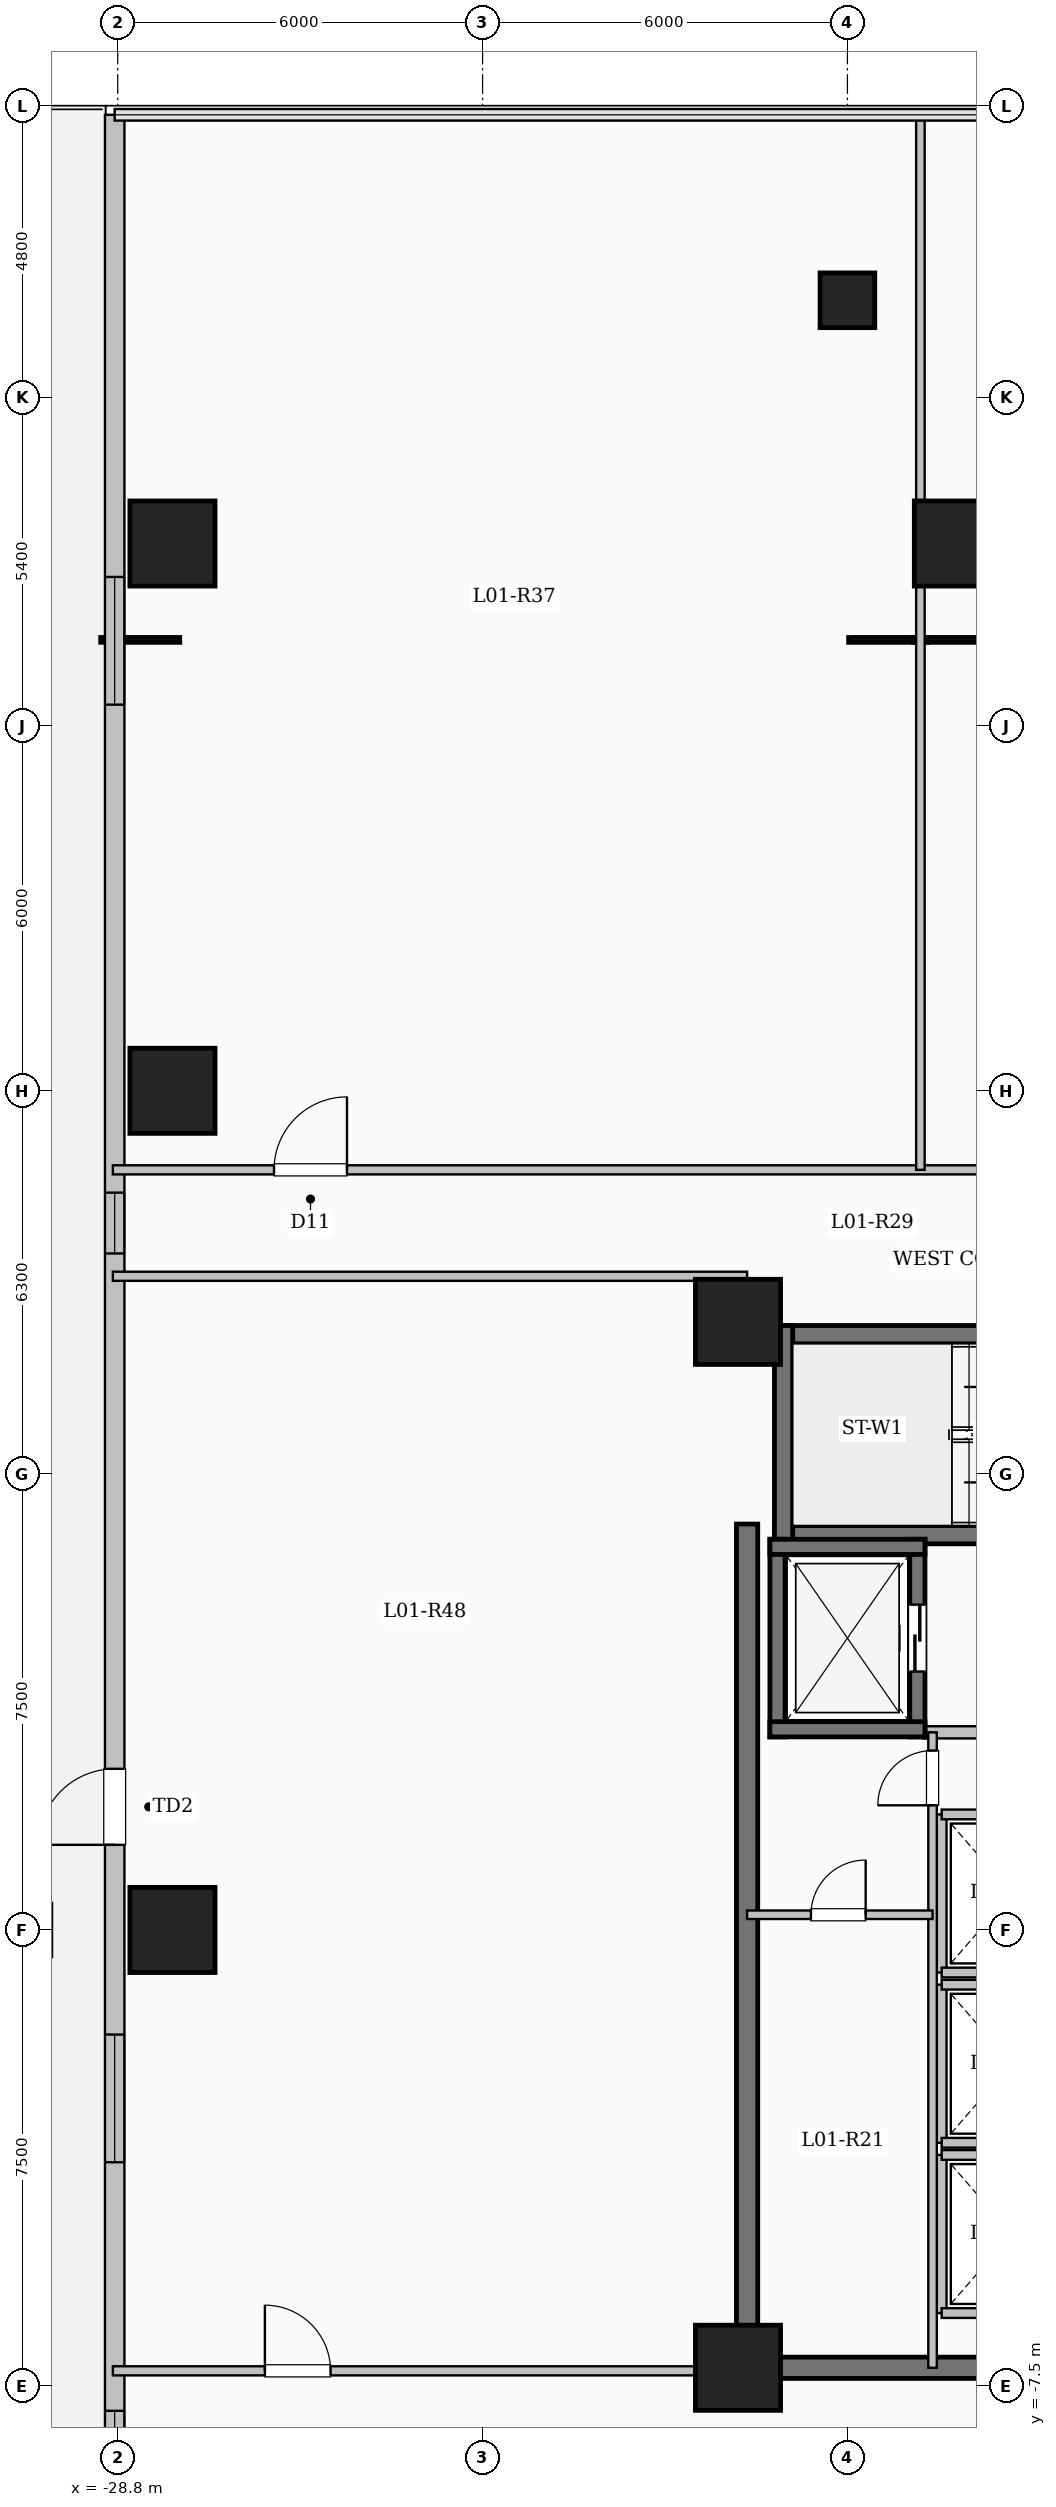
"""IFC4 building model, lengths in metres.
Left out: names, types, materials, properties, quantities, classifications, styles, units other than length and angle.
Written with IfcOpenShell. Run it as: python <this file> out.ifc"""

import sys

from ifc_helpers import new_model, si_unit, direction, frame, frame_2d, origin, origin_2d, place, context, subcontext, project, spatial, rectangle, extrude, element, fill, save


model = new_model("IFC4")
c1 = context("Model", 3, precision=1e-05, world=origin(), true_north=direction((0.0, 1.0)))
c2 = subcontext(c1, "Body", "Model", "MODEL_VIEW")
j1 = project(units=[si_unit("LENGTHUNIT", "METRE"), si_unit("PLANEANGLEUNIT", "RADIAN")], contexts=[c1])
p1 = place(None, origin())
s1 = spatial("IfcSite", under=j1, at=p1, CompositionType="ELEMENT")
p2 = place(p1, origin())
s2 = spatial("IfcBuilding", under=s1, at=p2, CompositionType="ELEMENT")
p3 = place(p2, frame((0.0, 0.0, 5.4)))
s3 = spatial("IfcBuildingStorey", under=s2, at=p3, CompositionType="ELEMENT", Elevation=5.4)
for number, where, z_axis, x_axis in (
    (1, (-18.6, -7.2, 0.0), (0.0, 0.0, 1.0), (1.0, 0.0, 0.0)),
    (2, (-18.6, 10.0, 0.0), (0.0, 0.0, 1.0), (1.0, 0.0, 0.0)),
):
    element("IfcColumn", number, at=place(p3, frame(where, z_axis=z_axis, x_axis=x_axis)), inside=s3, PredefinedType="COLUMN", context=c2, shape_type="SweptSolid", body=[
        extrude(rectangle(XDim=1.4, YDim=1.4, at=origin_2d()), origin(), (0.0, 0.0, 1.0), 4.5),
    ])
p4 = place(p3, frame((-16.8, 26.8, 0.0), z_axis=(0.0, 0.0, 1.0), x_axis=(1.0, 0.0, 0.0)))
e3 = element("IfcColumn", 3, at=p4, inside=s3, PredefinedType="COLUMN", context=c2, shape_type="SweptSolid", body=[
    extrude(rectangle(XDim=0.9, YDim=0.9, at=origin_2d()), origin(), (0.0, 0.0, 1.0), 4.5),
])
for number, where, z_axis, x_axis in (
    (4, (-27.9, 22.8, 0.0), (0.0, 0.0, 1.0), (1.0, 0.0, 0.0)),
    (5, (-15.0, 22.8, 0.0), (0.0, 0.0, 1.0), (1.0, 0.0, 0.0)),
    (6, (-27.9, 0.0, 0.0), (0.0, 0.0, 1.0), (1.0, 0.0, 0.0)),
    (7, (-27.9, 13.8, 0.0), (0.0, 0.0, 1.0), (1.0, 0.0, 0.0)),
):
    element("IfcColumn", number, at=place(p3, frame(where, z_axis=z_axis, x_axis=x_axis)), inside=s3, PredefinedType="COLUMN", context=c2, shape_type="SweptSolid", body=[
        extrude(rectangle(XDim=1.4, YDim=1.4, at=origin_2d()), origin(), (0.0, 0.0, 1.0), 4.5),
    ])
p5 = place(p3, frame((-28.85, -29.85, 0.0), z_axis=(0.0, 0.0, 1.0), x_axis=(0.0, 1.0, 0.0)))
e8 = element("IfcWall", 8, at=p5, inside=s3, PredefinedType="SOLIDWALL", context=c2, shape_type="SweptSolid", body=[
    extrude(rectangle(XDim=59.7, YDim=0.32, at=frame_2d((29.85, 0.0))), origin(), (0.0, 0.0, 1.0), 4.2),
])
p6 = place(p5, frame((31.25, 0.0, 0.0)))
e9 = element("IfcOpeningElement", 9, at=p6, cuts=e8, PredefinedType="OPENING", context=c2, shape_type="SweptSolid", body=[
    extrude(rectangle(XDim=1.25, YDim=2.25, at=frame_2d((0.625, 1.125))), frame((0.0, 0.17, 0.0), z_axis=(0.0, -1.0, 0.0), x_axis=(1.0, 0.0, 0.0)), (0.0, 0.0, 1.0), 0.34),
])
p7 = place(p5, frame((8.65, 0.0, 0.9)))
e10 = element("IfcOpeningElement", 10, at=p7, cuts=e8, PredefinedType="OPENING", context=c2, shape_type="SweptSolid", body=[
    extrude(rectangle(XDim=2.1, YDim=2.0, at=frame_2d((1.05, 1.0))), frame((0.0, 0.17, 0.0), z_axis=(0.0, -1.0, 0.0), x_axis=(1.0, 0.0, 0.0)), (0.0, 0.0, 1.0), 0.34),
])
p8 = place(p5, frame((20.242, 0.0, 0.9)))
e11 = element("IfcOpeningElement", 11, at=p8, cuts=e8, PredefinedType="OPENING", context=c2, shape_type="SweptSolid", body=[
    extrude(rectangle(XDim=1.7, YDim=1.9, at=frame_2d((0.85, 0.95))), frame((0.0, 0.17, 0.0), z_axis=(0.0, -1.0, 0.0), x_axis=(1.0, 0.0, 0.0)), (0.0, 0.0, 1.0), 0.34),
])
p9 = place(p5, frame((26.03, 0.0, 0.9)))
e12 = element("IfcOpeningElement", 12, at=p9, cuts=e8, PredefinedType="OPENING", context=c2, shape_type="SweptSolid", body=[
    extrude(rectangle(XDim=2.1, YDim=2.0, at=frame_2d((1.05, 1.0))), frame((0.0, 0.17, 0.0), z_axis=(0.0, -1.0, 0.0), x_axis=(1.0, 0.0, 0.0)), (0.0, 0.0, 1.0), 0.34),
])
p10 = place(p5, frame((40.975, 0.0, 0.95)))
e13 = element("IfcOpeningElement", 13, at=p10, cuts=e8, PredefinedType="OPENING", context=c2, shape_type="SweptSolid", body=[
    extrude(rectangle(XDim=1.0, YDim=1.5, at=frame_2d((0.5, 0.75))), frame((0.0, 0.17, 0.0), z_axis=(0.0, -1.0, 0.0), x_axis=(1.0, 0.0, 0.0)), (0.0, 0.0, 1.0), 0.34),
])
p11 = place(p5, frame((50.0, 0.0, 0.9)))
e14 = element("IfcOpeningElement", 14, at=p11, cuts=e8, PredefinedType="OPENING", context=c2, shape_type="SweptSolid", body=[
    extrude(rectangle(XDim=2.1, YDim=2.0, at=frame_2d((1.05, 1.0))), frame((0.0, 0.17, 0.0), z_axis=(0.0, -1.0, 0.0), x_axis=(1.0, 0.0, 0.0)), (0.0, 0.0, 1.0), 0.34),
])
p12 = place(p3, frame((-18.0, 9.79, 0.0), z_axis=(0.0, 0.0, 1.0), x_axis=(1.0, 0.0, 0.0)))
e15 = element("IfcWall", 15, at=p12, inside=s3, PredefinedType="SHEAR", context=c2, shape_type="SweptSolid", body=[
    extrude(rectangle(XDim=8.0, YDim=0.3, at=frame_2d((4.0, 0.0))), origin(), (0.0, 0.0, 1.0), 4.5),
])
p13 = place(p3, frame((-18.0, 6.5, 0.0), z_axis=(0.0, 0.0, 1.0), x_axis=(1.0, 0.0, 0.0)))
e16 = element("IfcWall", 16, at=p13, inside=s3, PredefinedType="SHEAR", context=c2, shape_type="SweptSolid", body=[
    extrude(rectangle(XDim=8.0, YDim=0.3, at=frame_2d((4.0, 0.0))), origin(), (0.0, 0.0, 1.0), 4.5),
])
p14 = place(p13, frame((6.45, 0.0, 0.0)))
e17 = element("IfcOpeningElement", 17, at=p14, cuts=e16, PredefinedType="OPENING", context=c2, shape_type="SweptSolid", body=[
    extrude(rectangle(XDim=1.0, YDim=2.15, at=frame_2d((0.5, 1.075))), frame((0.0, 0.16, 0.0), z_axis=(0.0, -1.0, 0.0), x_axis=(1.0, 0.0, 0.0)), (0.0, 0.0, 1.0), 0.32),
])
p15 = place(p3, frame((-17.85, 6.35, 0.0), z_axis=(0.0, 0.0, 1.0), x_axis=(0.0, 1.0, 0.0)))
e18 = element("IfcWall", 18, at=p15, inside=s3, PredefinedType="SHEAR", context=c2, shape_type="SweptSolid", body=[
    extrude(rectangle(XDim=3.59, YDim=0.3, at=frame_2d((1.795, 0.0))), origin(), (0.0, 0.0, 1.0), 4.5),
])
p16 = place(p3, frame((-15.55, 3.25, 0.0), z_axis=(0.0, 0.0, 1.0), x_axis=(1.0, 0.0, 0.0)))
e19 = element("IfcWall", 19, at=p16, inside=s3, PredefinedType="SOLIDWALL", context=c2, shape_type="SweptSolid", body=[
    extrude(rectangle(XDim=5.4, YDim=0.2, at=frame_2d((2.7, 0.0))), origin(), (0.0, 0.0, 1.0), 4.2),
])
p17 = place(p3, frame((-17.95, 3.175, 0.0), z_axis=(0.0, 0.0, 1.0), x_axis=(0.0, 1.0, 0.0)))
e20 = element("IfcWall", 20, at=p17, inside=s3, PredefinedType="SHEAR", context=c2, shape_type="SweptSolid", body=[
    extrude(rectangle(XDim=3.25, YDim=0.25, at=frame_2d((1.625, 0.0))), origin(), (0.0, 0.0, 1.0), 4.5),
])
p18 = place(p3, frame((-15.65, 3.175, 0.0), z_axis=(0.0, 0.0, 1.0), x_axis=(0.0, 1.0, 0.0)))
e21 = element("IfcWall", 21, at=p18, inside=s3, PredefinedType="SHEAR", context=c2, shape_type="SweptSolid", body=[
    extrude(rectangle(XDim=3.25, YDim=0.25, at=frame_2d((1.625, 0.0))), origin(), (0.0, 0.0, 1.0), 4.5),
])
p19 = place(p18, frame((1.075, 0.0, 0.0)))
e22 = element("IfcOpeningElement", 22, at=p19, cuts=e21, PredefinedType="OPENING", context=c2, shape_type="SweptSolid", body=[
    extrude(rectangle(XDim=1.1, YDim=2.15, at=frame_2d((0.55, 1.075))), frame((0.0, 0.135, 0.0), z_axis=(0.0, -1.0, 0.0), x_axis=(1.0, 0.0, 0.0)), (0.0, 0.0, 1.0), 0.27),
])
for number, where, z_axis, x_axis in (
    (23, (-18.075, 3.3, 0.0), (0.0, 0.0, 1.0), (1.0, 0.0, 0.0)),
    (24, (-18.075, 6.3, 0.0), (0.0, 0.0, 1.0), (1.0, 0.0, 0.0)),
):
    element("IfcWall", number, at=place(p3, frame(where, z_axis=z_axis, x_axis=x_axis)), inside=s3, PredefinedType="SHEAR", context=c2, shape_type="SweptSolid", body=[
        extrude(rectangle(XDim=2.55, YDim=0.25, at=frame_2d((1.275, 0.0))), origin(), (0.0, 0.0, 1.0), 4.5),
    ])
p20 = place(p3, frame((-15.25, -6.3, 0.0), z_axis=(0.0, 0.0, 1.0), x_axis=(0.0, 1.0, 0.0)))
e25 = element("IfcWall", 25, at=p20, inside=s3, PredefinedType="SOLIDWALL", context=c2, shape_type="SweptSolid", body=[
    extrude(rectangle(XDim=2.6, YDim=0.16, at=frame_2d((1.3, 0.0))), origin(), (0.0, 0.0, 1.0), 4.2),
])
for number, where, z_axis, x_axis in (
    (26, (-15.25, -6.3, 0.0), (0.0, 0.0, 1.0), (1.0, 0.0, 0.0)),
    (27, (-15.25, -3.7, 0.0), (0.0, 0.0, 1.0), (1.0, 0.0, 0.0)),
):
    element("IfcWall", number, at=place(p3, frame(where, z_axis=z_axis, x_axis=x_axis)), inside=s3, PredefinedType="SOLIDWALL", context=c2, shape_type="SweptSolid", body=[
        extrude(rectangle(XDim=2.3, YDim=0.16, at=frame_2d((1.15, 0.0))), origin(), (0.0, 0.0, 1.0), 4.2),
    ])
p21 = place(p3, frame((-15.25, -3.5, 0.0), z_axis=(0.0, 0.0, 1.0), x_axis=(0.0, 1.0, 0.0)))
e28 = element("IfcWall", 28, at=p21, inside=s3, PredefinedType="SOLIDWALL", context=c2, shape_type="SweptSolid", body=[
    extrude(rectangle(XDim=2.6, YDim=0.16, at=frame_2d((1.3, 0.0))), origin(), (0.0, 0.0, 1.0), 4.2),
])
for number, where, z_axis, x_axis in (
    (29, (-15.25, -3.5, 0.0), (0.0, 0.0, 1.0), (1.0, 0.0, 0.0)),
    (30, (-15.25, -0.9, 0.0), (0.0, 0.0, 1.0), (1.0, 0.0, 0.0)),
):
    element("IfcWall", number, at=place(p3, frame(where, z_axis=z_axis, x_axis=x_axis)), inside=s3, PredefinedType="SOLIDWALL", context=c2, shape_type="SweptSolid", body=[
        extrude(rectangle(XDim=2.3, YDim=0.16, at=frame_2d((1.15, 0.0))), origin(), (0.0, 0.0, 1.0), 4.2),
    ])
p22 = place(p3, frame((-15.25, -0.7, 0.0), z_axis=(0.0, 0.0, 1.0), x_axis=(0.0, 1.0, 0.0)))
e31 = element("IfcWall", 31, at=p22, inside=s3, PredefinedType="SOLIDWALL", context=c2, shape_type="SweptSolid", body=[
    extrude(rectangle(XDim=2.6, YDim=0.16, at=frame_2d((1.3, 0.0))), origin(), (0.0, 0.0, 1.0), 4.2),
])
for number, where, z_axis, x_axis in (
    (32, (-15.25, -0.7, 0.0), (0.0, 0.0, 1.0), (1.0, 0.0, 0.0)),
    (33, (-15.25, 1.9, 0.0), (0.0, 0.0, 1.0), (1.0, 0.0, 0.0)),
):
    element("IfcWall", number, at=place(p3, frame(where, z_axis=z_axis, x_axis=x_axis)), inside=s3, PredefinedType="SOLIDWALL", context=c2, shape_type="SweptSolid", body=[
        extrude(rectangle(XDim=2.3, YDim=0.16, at=frame_2d((1.15, 0.0))), origin(), (0.0, 0.0, 1.0), 4.2),
    ])
p23 = place(p3, frame((-18.45, -7.375, 0.0), z_axis=(0.0, 0.0, 1.0), x_axis=(0.0, 1.0, 0.0)))
e34 = element("IfcWall", 34, at=p23, inside=s3, PredefinedType="SHEAR", context=c2, shape_type="SweptSolid", body=[
    extrude(rectangle(XDim=14.05, YDim=0.35, at=frame_2d((7.025, 0.0))), origin(), (0.0, 0.0, 1.0), 4.5),
])
p24 = place(p3, frame((-18.625, -7.2, 0.0), z_axis=(0.0, 0.0, 1.0), x_axis=(1.0, 0.0, 0.0)))
e35 = element("IfcWall", 35, at=p24, inside=s3, PredefinedType="SHEAR", context=c2, shape_type="SweptSolid", body=[
    extrude(rectangle(XDim=8.55, YDim=0.35, at=frame_2d((4.275, 0.0))), origin(), (0.0, 0.0, 1.0), 4.5),
])
p25 = place(p3, frame((-15.4, -7.2, 0.0), z_axis=(0.0, 0.0, 1.0), x_axis=(0.0, 1.0, 0.0)))
e36 = element("IfcWall", 36, at=p25, inside=s3, PredefinedType="PARTITIONING", context=c2, shape_type="SweptSolid", body=[
    extrude(rectangle(XDim=10.45, YDim=0.14, at=frame_2d((5.225, 0.0))), origin(), (0.0, 0.0, 1.0), 4.2),
])
p26 = place(p25, frame((9.25, 0.0, 0.0)))
e37 = element("IfcOpeningElement", 37, at=p26, cuts=e36, PredefinedType="OPENING", context=c2, shape_type="SweptSolid", body=[
    extrude(rectangle(XDim=0.9, YDim=2.08, at=frame_2d((0.45, 1.04))), frame((0.0, 0.08, 0.0), z_axis=(0.0, -1.0, 0.0), x_axis=(1.0, 0.0, 0.0)), (0.0, 0.0, 1.0), 0.16),
])
p27 = place(p3, frame((-18.45, 0.25, 0.0), z_axis=(0.0, 0.0, 1.0), x_axis=(1.0, 0.0, 0.0)))
e38 = element("IfcWall", 38, at=p27, inside=s3, PredefinedType="PARTITIONING", context=c2, shape_type="SweptSolid", body=[
    extrude(rectangle(XDim=3.05, YDim=0.14, at=frame_2d((1.525, 0.0))), origin(), (0.0, 0.0, 1.0), 4.2),
])
p28 = place(p27, frame((1.05, 0.0, 0.0)))
e39 = element("IfcOpeningElement", 39, at=p28, cuts=e38, PredefinedType="OPENING", context=c2, shape_type="SweptSolid", body=[
    extrude(rectangle(XDim=0.9, YDim=2.08, at=frame_2d((0.45, 1.04))), frame((0.0, 0.08, 0.0), z_axis=(0.0, -1.0, 0.0), x_axis=(1.0, 0.0, 0.0)), (0.0, 0.0, 1.0), 0.16),
])
p29 = place(p3, frame((-28.88, 12.5, 0.0), z_axis=(0.0, 0.0, 1.0), x_axis=(1.0, 0.0, 0.0)))
e40 = element("IfcWall", 40, at=p29, inside=s3, PredefinedType="PARTITIONING", context=c2, shape_type="SweptSolid", body=[
    extrude(rectangle(XDim=25.03, YDim=0.15, at=frame_2d((12.515, 0.0))), origin(), (0.0, 0.0, 1.0), 4.2),
])
p30 = place(p29, frame((2.65, 0.0, 0.0)))
e41 = element("IfcOpeningElement", 41, at=p30, cuts=e40, PredefinedType="OPENING", context=c2, shape_type="SweptSolid", body=[
    extrude(rectangle(XDim=1.2, YDim=2.15, at=frame_2d((0.6, 1.075))), frame((0.0, 0.085, 0.0), z_axis=(0.0, -1.0, 0.0), x_axis=(1.0, 0.0, 0.0)), (0.0, 0.0, 1.0), 0.17),
])
p31 = place(p29, frame((14.68, 0.0, 0.0)))
e42 = element("IfcOpeningElement", 42, at=p31, cuts=e40, PredefinedType="OPENING", context=c2, shape_type="SweptSolid", body=[
    extrude(rectangle(XDim=1.08, YDim=2.15, at=frame_2d((0.54, 1.075))), frame((0.0, 0.085, 0.0), z_axis=(0.0, -1.0, 0.0), x_axis=(1.0, 0.0, 0.0)), (0.0, 0.0, 1.0), 0.17),
])
p32 = place(p29, frame((20.52, 0.0, 0.0)))
e43 = element("IfcOpeningElement", 43, at=p32, cuts=e40, PredefinedType="OPENING", context=c2, shape_type="SweptSolid", body=[
    extrude(rectangle(XDim=1.08, YDim=2.15, at=frame_2d((0.54, 1.075))), frame((0.0, 0.085, 0.0), z_axis=(0.0, -1.0, 0.0), x_axis=(1.0, 0.0, 0.0)), (0.0, 0.0, 1.0), 0.17),
])
p33 = place(p3, frame((-15.6, 12.5, 0.0), z_axis=(0.0, 0.0, 1.0), x_axis=(0.0, 1.0, 0.0)))
e44 = element("IfcWall", 44, at=p33, inside=s3, PredefinedType="PARTITIONING", context=c2, shape_type="SweptSolid", body=[
    extrude(rectangle(XDim=17.38, YDim=0.14, at=frame_2d((8.69, 0.0))), origin(), (0.0, 0.0, 1.0), 3.385),
])
p34 = place(p3, frame((-28.88, -7.25, 0.0), z_axis=(0.0, 0.0, 1.0), x_axis=(1.0, 0.0, 0.0)))
e45 = element("IfcWall", 45, at=p34, inside=s3, PredefinedType="PARTITIONING", context=c2, shape_type="SweptSolid", body=[
    extrude(rectangle(XDim=10.43, YDim=0.15, at=frame_2d((5.215, 0.0))), origin(), (0.0, 0.0, 1.0), 4.2),
])
p35 = place(p34, frame((2.5, 0.0, 0.0)))
e46 = element("IfcOpeningElement", 46, at=p35, cuts=e45, PredefinedType="OPENING", context=c2, shape_type="SweptSolid", body=[
    extrude(rectangle(XDim=1.08, YDim=2.15, at=frame_2d((0.54, 1.075))), frame((0.0, 0.085, 0.0), z_axis=(0.0, -1.0, 0.0), x_axis=(1.0, 0.0, 0.0)), (0.0, 0.0, 1.0), 0.17),
])
p36 = place(p3, frame((-28.88, 10.75, 0.0), z_axis=(0.0, 0.0, 1.0), x_axis=(1.0, 0.0, 0.0)))
e47 = element("IfcWall", 47, at=p36, inside=s3, PredefinedType="PARTITIONING", context=c2, shape_type="SweptSolid", body=[
    extrude(rectangle(XDim=10.43, YDim=0.15, at=frame_2d((5.215, 0.0))), origin(), (0.0, 0.0, 1.0), 4.2),
])
p37 = place(p6, origin())
e48 = element("IfcDoor", 48, at=p37, inside=s3, OperationType="SINGLE_SWING_LEFT", PredefinedType="DOOR", context=c2, shape_type="SweptSolid", body=[
    extrude(rectangle(XDim=1.25, YDim=2.25, at=frame_2d((0.625, 1.125))), frame((0.0, 0.025, 0.0), z_axis=(0.0, -1.0, 0.0), x_axis=(1.0, 0.0, 0.0)), (0.0, 0.0, 1.0), 0.05),
])
fill(e9, e48)
p38 = place(p8, origin())
e49 = element("IfcWindow", 49, at=p38, inside=s3, PartitioningType="SINGLE_PANEL", PredefinedType="WINDOW", context=c2, shape_type="SweptSolid", body=[
    extrude(rectangle(XDim=1.7, YDim=1.9, at=frame_2d((0.85, 0.95))), frame((0.0, 0.03, 0.0), z_axis=(0.0, -1.0, 0.0), x_axis=(1.0, 0.0, 0.0)), (0.0, 0.0, 1.0), 0.06),
])
fill(e11, e49)
p39 = place(p9, origin())
e50 = element("IfcWindow", 50, at=p39, inside=s3, PartitioningType="SINGLE_PANEL", PredefinedType="WINDOW", context=c2, shape_type="SweptSolid", body=[
    extrude(rectangle(XDim=2.1, YDim=2.0, at=frame_2d((1.05, 1.0))), frame((0.0, 0.03, 0.0), z_axis=(0.0, -1.0, 0.0), x_axis=(1.0, 0.0, 0.0)), (0.0, 0.0, 1.0), 0.06),
])
fill(e12, e50)
p40 = place(p10, origin())
e51 = element("IfcWindow", 51, at=p40, inside=s3, PartitioningType="SINGLE_PANEL", PredefinedType="WINDOW", context=c2, shape_type="SweptSolid", body=[
    extrude(rectangle(XDim=1.0, YDim=1.5, at=frame_2d((0.5, 0.75))), frame((0.0, 0.03, 0.0), z_axis=(0.0, -1.0, 0.0), x_axis=(1.0, 0.0, 0.0)), (0.0, 0.0, 1.0), 0.06),
])
fill(e13, e51)
p41 = place(p11, origin())
e52 = element("IfcWindow", 52, at=p41, inside=s3, PartitioningType="SINGLE_PANEL", PredefinedType="WINDOW", context=c2, shape_type="SweptSolid", body=[
    extrude(rectangle(XDim=2.1, YDim=2.0, at=frame_2d((1.05, 1.0))), frame((0.0, 0.03, 0.0), z_axis=(0.0, -1.0, 0.0), x_axis=(1.0, 0.0, 0.0)), (0.0, 0.0, 1.0), 0.06),
])
fill(e14, e52)
p42 = place(p19, origin())
e53 = element("IfcDoor", 53, at=p42, inside=s3, OperationType="SLIDING_TO_LEFT", PredefinedType="DOOR", context=c2, shape_type="SweptSolid", body=[
    extrude(rectangle(XDim=1.1, YDim=2.15, at=frame_2d((0.55, 1.075))), frame((0.0, 0.025, 0.0), z_axis=(0.0, -1.0, 0.0), x_axis=(1.0, 0.0, 0.0)), (0.0, 0.0, 1.0), 0.05),
])
fill(e22, e53)
p43 = place(p26, origin())
e54 = element("IfcDoor", 54, at=p43, inside=s3, OperationType="SINGLE_SWING_LEFT", PredefinedType="DOOR", context=c2, shape_type="SweptSolid", body=[
    extrude(rectangle(XDim=0.9, YDim=2.08, at=frame_2d((0.45, 1.04))), frame((0.0, 0.025, 0.0), z_axis=(0.0, -1.0, 0.0), x_axis=(1.0, 0.0, 0.0)), (0.0, 0.0, 1.0), 0.05),
])
fill(e37, e54)
p44 = place(p28, origin())
e55 = element("IfcDoor", 55, at=p44, inside=s3, OperationType="SINGLE_SWING_RIGHT", PredefinedType="DOOR", context=c2, shape_type="SweptSolid", body=[
    extrude(rectangle(XDim=0.9, YDim=2.08, at=frame_2d((0.45, 1.04))), frame((0.0, 0.025, 0.0), z_axis=(0.0, -1.0, 0.0), x_axis=(1.0, 0.0, 0.0)), (0.0, 0.0, 1.0), 0.05),
])
fill(e39, e55)
p45 = place(p30, origin())
e56 = element("IfcDoor", 56, at=p45, inside=s3, OperationType="SINGLE_SWING_RIGHT", PredefinedType="DOOR", context=c2, shape_type="SweptSolid", body=[
    extrude(rectangle(XDim=1.2, YDim=2.15, at=frame_2d((0.6, 1.075))), frame((0.0, 0.025, 0.0), z_axis=(0.0, -1.0, 0.0), x_axis=(1.0, 0.0, 0.0)), (0.0, 0.0, 1.0), 0.05),
])
fill(e41, e56)
p46 = place(p35, origin())
e57 = element("IfcDoor", 57, at=p46, inside=s3, OperationType="SINGLE_SWING_LEFT", PredefinedType="DOOR", context=c2, shape_type="SweptSolid", body=[
    extrude(rectangle(XDim=1.08, YDim=2.15, at=frame_2d((0.54, 1.075))), frame((0.0, 0.025, 0.0), z_axis=(0.0, -1.0, 0.0), x_axis=(1.0, 0.0, 0.0)), (0.0, 0.0, 1.0), 0.05),
])
fill(e46, e57)
save(model, sys.argv[1])
